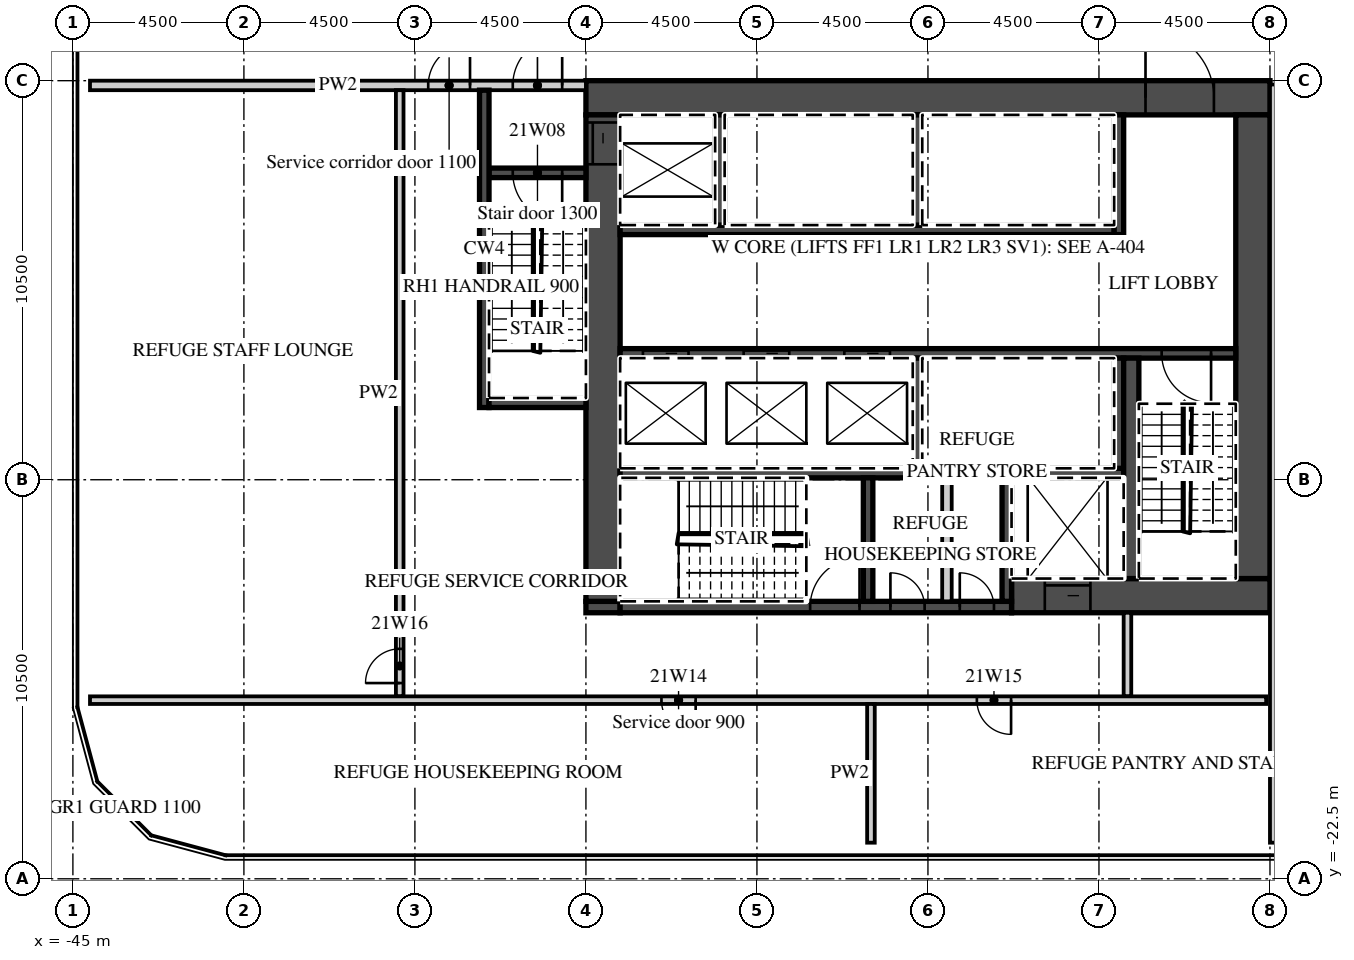
"""IFC4 building model, lengths in metres.
Left out: names, types, materials, properties, quantities, classifications, styles, units other than length and angle.
Written with IfcOpenShell. Run it as: python <this file> out.ifc"""

import sys

from ifc_helpers import new_model, si_unit, direction, frame, frame_2d, origin, place, context, subcontext, project, spatial, rectangle, extrude, element, fill, save


model = new_model("IFC4")
c1 = context("Model", 3, precision=1e-05, world=origin(), true_north=direction((0.0, 1.0)))
c2 = subcontext(c1, "Body", "Model", "MODEL_VIEW")
j1 = project(units=[si_unit("LENGTHUNIT", "METRE"), si_unit("PLANEANGLEUNIT", "RADIAN")], contexts=[c1])
p1 = place(None, origin())
s1 = spatial("IfcSite", under=j1, at=p1, CompositionType="ELEMENT")
p2 = place(p1, origin())
s2 = spatial("IfcBuilding", under=s1, at=p2, CompositionType="ELEMENT")
p3 = place(p2, frame((0.0, 0.0, 99.6)))
s3 = spatial("IfcBuildingStorey", under=s2, at=p3, CompositionType="ELEMENT", Elevation=99.6)
p4 = place(p3, frame((-31.5, -1.95, 0.0), z_axis=(0.0, 0.0, 1.0), x_axis=(1.0, 0.0, 0.0)))
e1 = element("IfcWall", 1, at=p4, inside=s3, PredefinedType="SHEAR", context=c2, shape_type="SweptSolid", body=[
    extrude(rectangle(XDim=18.0, YDim=0.9, at=frame_2d((9.0, 0.0))), origin(), (0.0, 0.0, 1.0), 4.2),
])
p5 = place(p4, frame((14.725, 0.0, 0.0)))
e2 = element("IfcOpeningElement", 2, at=p5, cuts=e1, PredefinedType="OPENING", context=c2, shape_type="SweptSolid", body=[
    extrude(rectangle(XDim=1.8, YDim=2.1, at=frame_2d((0.9, 1.05))), frame((0.0, 0.46, 0.0), z_axis=(0.0, -1.0, 0.0), x_axis=(1.0, 0.0, 0.0)), (0.0, 0.0, 1.0), 0.92),
])
p6 = place(p3, frame((-20.3, -15.05, 0.0), z_axis=(0.0, 0.0, 1.0), x_axis=(1.0, 0.0, 0.0)))
e3 = element("IfcWall", 3, at=p6, inside=s3, PredefinedType="SHEAR", context=c2, shape_type="SweptSolid", body=[
    extrude(rectangle(XDim=6.8, YDim=0.9, at=frame_2d((3.4, 0.0))), origin(), (0.0, 0.0, 1.0), 4.2),
])
p7 = place(p6, frame((0.875, 0.0, 0.0)))
e4 = element("IfcOpeningElement", 4, at=p7, cuts=e3, PredefinedType="OPENING", context=c2, shape_type="SweptSolid", body=[
    extrude(rectangle(XDim=1.2, YDim=2.1, at=frame_2d((0.6, 1.05))), frame((0.0, 0.46, 0.0), z_axis=(0.0, -1.0, 0.0), x_axis=(1.0, 0.0, 0.0)), (0.0, 0.0, 1.0), 0.92),
])
p8 = place(p3, frame((-31.5, -15.35, 0.0), z_axis=(0.0, 0.0, 1.0), x_axis=(1.0, 0.0, 0.0)))
e5 = element("IfcWall", 5, at=p8, inside=s3, PredefinedType="SHEAR", context=c2, shape_type="SweptSolid", body=[
    extrude(rectangle(XDim=0.9, YDim=0.3, at=frame_2d((0.45, 0.0))), origin(), (0.0, 0.0, 1.0), 4.2),
])
p9 = place(p3, frame((-30.6, -15.35, 0.0), z_axis=(0.0, 0.0, 1.0), x_axis=(1.0, 0.0, 0.0)))
e6 = element("IfcWall", 6, at=p9, inside=s3, PredefinedType="SHEAR", context=c2, shape_type="SweptSolid", body=[
    extrude(rectangle(XDim=10.3, YDim=0.3, at=frame_2d((5.15, 0.0))), origin(), (0.0, 0.0, 1.0), 4.2),
])
p10 = place(p9, frame((5.0, 0.0, 0.0)))
e7 = element("IfcOpeningElement", 7, at=p10, cuts=e6, PredefinedType="OPENING", context=c2, shape_type="SweptSolid", body=[
    extrude(rectangle(XDim=1.3, YDim=2.1, at=frame_2d((0.65, 1.05))), frame((0.0, 0.16, 0.0), z_axis=(0.0, -1.0, 0.0), x_axis=(1.0, 0.0, 0.0)), (0.0, 0.0, 1.0), 0.32),
])
p11 = place(p9, frame((7.113, 0.0, 0.0)))
e8 = element("IfcOpeningElement", 8, at=p11, cuts=e6, PredefinedType="OPENING", context=c2, shape_type="SweptSolid", body=[
    extrude(rectangle(XDim=0.9, YDim=2.1, at=frame_2d((0.45, 1.05))), frame((0.0, 0.16, 0.0), z_axis=(0.0, -1.0, 0.0), x_axis=(1.0, 0.0, 0.0)), (0.0, 0.0, 1.0), 0.32),
])
p12 = place(p9, frame((8.938, 0.0, 0.0)))
e9 = element("IfcOpeningElement", 9, at=p12, cuts=e6, PredefinedType="OPENING", context=c2, shape_type="SweptSolid", body=[
    extrude(rectangle(XDim=0.9, YDim=2.1, at=frame_2d((0.45, 1.05))), frame((0.0, 0.16, 0.0), z_axis=(0.0, -1.0, 0.0), x_axis=(1.0, 0.0, 0.0)), (0.0, 0.0, 1.0), 0.32),
])
p13 = place(p3, frame((-31.05, -15.2, 0.0), z_axis=(0.0, 0.0, 1.0), x_axis=(0.0, 1.0, 0.0)))
e10 = element("IfcWall", 10, at=p13, inside=s3, PredefinedType="SHEAR", context=c2, shape_type="SweptSolid", body=[
    extrude(rectangle(XDim=12.8, YDim=0.9, at=frame_2d((6.4, 0.0))), origin(), (0.0, 0.0, 1.0), 4.2),
])
p14 = place(p13, frame((11.5, 0.0, 0.0)))
e11 = element("IfcOpeningElement", 11, at=p14, cuts=e10, PredefinedType="OPENING", context=c2, shape_type="SweptSolid", body=[
    extrude(rectangle(XDim=1.1, YDim=2.1, at=frame_2d((0.55, 1.05))), frame((0.0, 0.46, 0.0), z_axis=(0.0, -1.0, 0.0), x_axis=(1.0, 0.0, 0.0)), (0.0, 0.0, 1.0), 0.92),
])
p15 = place(p3, frame((-13.95, -14.6, 0.0), z_axis=(0.0, 0.0, 1.0), x_axis=(0.0, 1.0, 0.0)))
e12 = element("IfcWall", 12, at=p15, inside=s3, PredefinedType="SHEAR", context=c2, shape_type="SweptSolid", body=[
    extrude(rectangle(XDim=12.2, YDim=0.9, at=frame_2d((6.1, 0.0))), origin(), (0.0, 0.0, 1.0), 4.2),
])
p16 = place(p3, frame((-30.6, -5.425, 0.0), z_axis=(0.0, 0.0, 1.0), x_axis=(1.0, 0.0, 0.0)))
e13 = element("IfcWall", 13, at=p16, inside=s3, PredefinedType="SHEAR", context=c2, shape_type="SweptSolid", body=[
    extrude(rectangle(XDim=13.0, YDim=0.25, at=frame_2d((6.5, 0.0))), origin(), (0.0, 0.0, 1.0), 4.2),
])
p17 = place(p3, frame((-17.475, -5.55, 0.0), z_axis=(0.0, 0.0, 1.0), x_axis=(0.0, 1.0, 0.0)))
e14 = element("IfcWall", 14, at=p17, inside=s3, PredefinedType="SHEAR", context=c2, shape_type="SweptSolid", body=[
    extrude(rectangle(XDim=3.15, YDim=0.25, at=frame_2d((1.575, 0.0))), origin(), (0.0, 0.0, 1.0), 4.2),
])
for number, where, z_axis, x_axis in (
    (15, (-27.975, -5.3, 0.0), (0.0, 0.0, 1.0), (0.0, 1.0, 0.0)),
    (16, (-22.775, -5.3, 0.0), (0.0, 0.0, 1.0), (0.0, 1.0, 0.0)),
):
    element("IfcWall", number, at=place(p3, frame(where, z_axis=z_axis, x_axis=x_axis)), inside=s3, PredefinedType="SHEAR", context=c2, shape_type="SweptSolid", body=[
        extrude(rectangle(XDim=2.9, YDim=0.25, at=frame_2d((1.45, 0.0))), origin(), (0.0, 0.0, 1.0), 4.2),
    ])
p18 = place(p3, frame((-30.6, -8.675, 0.0), z_axis=(0.0, 0.0, 1.0), x_axis=(1.0, 0.0, 0.0)))
e17 = element("IfcWall", 17, at=p18, inside=s3, PredefinedType="SHEAR", context=c2, shape_type="SweptSolid", body=[
    extrude(rectangle(XDim=16.2, YDim=0.25, at=frame_2d((8.1, 0.0))), origin(), (0.0, 0.0, 1.0), 4.2),
])
p19 = place(p18, frame((0.6, 0.0, 0.0)))
e18 = element("IfcOpeningElement", 18, at=p19, cuts=e17, PredefinedType="OPENING", context=c2, shape_type="SweptSolid", body=[
    extrude(rectangle(XDim=1.2, YDim=2.1, at=frame_2d((0.6, 1.05))), frame((0.0, 0.135, 0.0), z_axis=(0.0, -1.0, 0.0), x_axis=(1.0, 0.0, 0.0)), (0.0, 0.0, 1.0), 0.27),
])
p20 = place(p18, frame((3.25, 0.0, 0.0)))
e19 = element("IfcOpeningElement", 19, at=p20, cuts=e17, PredefinedType="OPENING", context=c2, shape_type="SweptSolid", body=[
    extrude(rectangle(XDim=1.2, YDim=2.1, at=frame_2d((0.6, 1.05))), frame((0.0, 0.135, 0.0), z_axis=(0.0, -1.0, 0.0), x_axis=(1.0, 0.0, 0.0)), (0.0, 0.0, 1.0), 0.27),
])
p21 = place(p18, frame((5.9, 0.0, 0.0)))
e20 = element("IfcOpeningElement", 20, at=p21, cuts=e17, PredefinedType="OPENING", context=c2, shape_type="SweptSolid", body=[
    extrude(rectangle(XDim=1.2, YDim=2.1, at=frame_2d((0.6, 1.05))), frame((0.0, 0.135, 0.0), z_axis=(0.0, -1.0, 0.0), x_axis=(1.0, 0.0, 0.0)), (0.0, 0.0, 1.0), 0.27),
])
p22 = place(p18, frame((14.25, 0.0, 0.0)))
e21 = element("IfcOpeningElement", 21, at=p22, cuts=e17, PredefinedType="OPENING", context=c2, shape_type="SweptSolid", body=[
    extrude(rectangle(XDim=1.3, YDim=2.1, at=frame_2d((0.65, 1.05))), frame((0.0, 0.135, 0.0), z_axis=(0.0, -1.0, 0.0), x_axis=(1.0, 0.0, 0.0)), (0.0, 0.0, 1.0), 0.27),
])
p23 = place(p3, frame((-30.6, -11.825, 0.0), z_axis=(0.0, 0.0, 1.0), x_axis=(1.0, 0.0, 0.0)))
e22 = element("IfcWall", 22, at=p23, inside=s3, PredefinedType="SHEAR", context=c2, shape_type="SweptSolid", body=[
    extrude(rectangle(XDim=13.25, YDim=0.25, at=frame_2d((6.625, 0.0))), origin(), (0.0, 0.0, 1.0), 4.2),
])
for number, where, z_axis, x_axis in (
    (23, (-17.475, -11.7, 0.0), (0.0, 0.0, 1.0), (0.0, 1.0, 0.0)),
    (24, (-22.775, -11.7, 0.0), (0.0, 0.0, 1.0), (0.0, 1.0, 0.0)),
):
    element("IfcWall", number, at=place(p3, frame(where, z_axis=z_axis, x_axis=x_axis)), inside=s3, PredefinedType="SHEAR", context=c2, shape_type="SweptSolid", body=[
        extrude(rectangle(XDim=2.9, YDim=0.25, at=frame_2d((1.45, 0.0))), origin(), (0.0, 0.0, 1.0), 4.2),
    ])
p24 = place(p3, frame((-17.15, -14.6, 0.0), z_axis=(0.0, 0.0, 1.0), x_axis=(0.0, 1.0, 0.0)))
e25 = element("IfcWall", 25, at=p24, inside=s3, PredefinedType="SHEAR", context=c2, shape_type="SweptSolid", body=[
    extrude(rectangle(XDim=5.8, YDim=0.4, at=frame_2d((2.9, 0.0))), origin(), (0.0, 0.0, 1.0), 4.2),
])
for number, where, z_axis, x_axis in (
    (26, (-20.425, -15.2, 0.0), (0.0, 0.0, 1.0), (0.0, 1.0, 0.0)),
    (27, (-24.075, -15.2, 0.0), (0.0, 0.0, 1.0), (0.0, 1.0, 0.0)),
):
    element("IfcWall", number, at=place(p3, frame(where, z_axis=z_axis, x_axis=x_axis)), inside=s3, PredefinedType="SHEAR", context=c2, shape_type="SweptSolid", body=[
        extrude(rectangle(XDim=3.25, YDim=0.25, at=frame_2d((1.625, 0.0))), origin(), (0.0, 0.0, 1.0), 4.2),
    ])
p25 = place(p3, frame((-22.0, -15.2, 0.0), z_axis=(0.0, 0.0, 1.0), x_axis=(0.0, 1.0, 0.0)))
e28 = element("IfcWall", 28, at=p25, inside=s3, PredefinedType="PARTITIONING", context=c2, shape_type="SweptSolid", body=[
    extrude(rectangle(XDim=3.25, YDim=0.25, at=frame_2d((1.625, 0.0))), origin(), (0.0, 0.0, 1.0), 4.2),
])
p26 = place(p3, frame((-44.55, -1.625, 0.0), z_axis=(0.0, 0.0, 1.0), x_axis=(1.0, 0.0, 0.0)))
e29 = element("IfcWall", 29, at=p26, inside=s3, PredefinedType="PARTITIONING", context=c2, shape_type="SweptSolid", body=[
    extrude(rectangle(XDim=13.05, YDim=0.25, at=frame_2d((6.525, 0.0))), origin(), (0.0, 0.0, 1.0), 4.2),
])
p27 = place(p26, frame((11.125, 0.0, 0.0)))
e30 = element("IfcOpeningElement", 30, at=p27, cuts=e29, PredefinedType="OPENING", context=c2, shape_type="SweptSolid", body=[
    extrude(rectangle(XDim=1.3, YDim=2.1, at=frame_2d((0.65, 1.05))), frame((0.0, 0.135, 0.0), z_axis=(0.0, -1.0, 0.0), x_axis=(1.0, 0.0, 0.0)), (0.0, 0.0, 1.0), 0.27),
])
p28 = place(p26, frame((8.9, 0.0, 0.0)))
e31 = element("IfcOpeningElement", 31, at=p28, cuts=e29, PredefinedType="OPENING", context=c2, shape_type="SweptSolid", body=[
    extrude(rectangle(XDim=1.1, YDim=2.1, at=frame_2d((0.55, 1.05))), frame((0.0, 0.135, 0.0), z_axis=(0.0, -1.0, 0.0), x_axis=(1.0, 0.0, 0.0)), (0.0, 0.0, 1.0), 0.27),
])
p29 = place(p3, frame((-34.05, -3.925, 0.0), z_axis=(0.0, 0.0, 1.0), x_axis=(1.0, 0.0, 0.0)))
e32 = element("IfcWall", 32, at=p29, inside=s3, PredefinedType="SHEAR", context=c2, shape_type="SweptSolid", body=[
    extrude(rectangle(XDim=2.55, YDim=0.25, at=frame_2d((1.275, 0.0))), origin(), (0.0, 0.0, 1.0), 4.2),
])
p30 = place(p29, frame((0.625, 0.0, 0.0)))
e33 = element("IfcOpeningElement", 33, at=p30, cuts=e32, PredefinedType="OPENING", context=c2, shape_type="SweptSolid", body=[
    extrude(rectangle(XDim=1.3, YDim=2.1, at=frame_2d((0.65, 1.05))), frame((0.0, 0.135, 0.0), z_axis=(0.0, -1.0, 0.0), x_axis=(1.0, 0.0, 0.0)), (0.0, 0.0, 1.0), 0.27),
])
p31 = place(p3, frame((-34.175, -10.1, 0.0), z_axis=(0.0, 0.0, 1.0), x_axis=(0.0, 1.0, 0.0)))
e34 = element("IfcWall", 34, at=p31, inside=s3, PredefinedType="SHEAR", context=c2, shape_type="SweptSolid", body=[
    extrude(rectangle(XDim=8.35, YDim=0.25, at=frame_2d((4.175, 0.0))), origin(), (0.0, 0.0, 1.0), 4.2),
])
p32 = place(p3, frame((-34.05, -9.975, 0.0), z_axis=(0.0, 0.0, 1.0), x_axis=(1.0, 0.0, 0.0)))
e35 = element("IfcWall", 35, at=p32, inside=s3, PredefinedType="SHEAR", context=c2, shape_type="SweptSolid", body=[
    extrude(rectangle(XDim=2.55, YDim=0.25, at=frame_2d((1.275, 0.0))), origin(), (0.0, 0.0, 1.0), 4.2),
])
p33 = place(p3, frame((-17.25, -17.7, 0.0), z_axis=(0.0, 0.0, 1.0), x_axis=(0.0, 1.0, 0.0)))
e36 = element("IfcWall", 36, at=p33, inside=s3, PredefinedType="PARTITIONING", context=c2, shape_type="SweptSolid", body=[
    extrude(rectangle(XDim=2.2, YDim=0.2, at=frame_2d((1.1, 0.0))), origin(), (0.0, 0.0, 1.0), 4.2),
])
p34 = place(p3, frame((-36.4, -17.7, 0.0), z_axis=(0.0, 0.0, 1.0), x_axis=(0.0, 1.0, 0.0)))
e37 = element("IfcWall", 37, at=p34, inside=s3, PredefinedType="PARTITIONING", context=c2, shape_type="SweptSolid", body=[
    extrude(rectangle(XDim=15.95, YDim=0.2, at=frame_2d((7.975, 0.0))), origin(), (0.0, 0.0, 1.0), 4.2),
])
p35 = place(p34, frame((0.35, 0.0, 0.0)))
e38 = element("IfcOpeningElement", 38, at=p35, cuts=e37, PredefinedType="OPENING", context=c2, shape_type="SweptSolid", body=[
    extrude(rectangle(XDim=0.9, YDim=2.1, at=frame_2d((0.45, 1.05))), frame((0.0, 0.11, 0.0), z_axis=(0.0, -1.0, 0.0), x_axis=(1.0, 0.0, 0.0)), (0.0, 0.0, 1.0), 0.22),
])
p36 = place(p3, frame((-44.55, -17.8, 0.0), z_axis=(0.0, 0.0, 1.0), x_axis=(1.0, 0.0, 0.0)))
e39 = element("IfcWall", 39, at=p36, inside=s3, PredefinedType="PARTITIONING", context=c2, shape_type="SweptSolid", body=[
    extrude(rectangle(XDim=30.95, YDim=0.2, at=frame_2d((15.475, 0.0))), origin(), (0.0, 0.0, 1.0), 4.2),
])
p37 = place(p36, frame((15.038, 0.0, 0.0)))
e40 = element("IfcOpeningElement", 40, at=p37, cuts=e39, PredefinedType="OPENING", context=c2, shape_type="SweptSolid", body=[
    extrude(rectangle(XDim=0.9, YDim=2.1, at=frame_2d((0.45, 1.05))), frame((0.0, 0.11, 0.0), z_axis=(0.0, -1.0, 0.0), x_axis=(1.0, 0.0, 0.0)), (0.0, 0.0, 1.0), 0.22),
])
p38 = place(p36, frame((23.337, 0.0, 0.0)))
e41 = element("IfcOpeningElement", 41, at=p38, cuts=e39, PredefinedType="OPENING", context=c2, shape_type="SweptSolid", body=[
    extrude(rectangle(XDim=0.9, YDim=2.1, at=frame_2d((0.45, 1.05))), frame((0.0, 0.11, 0.0), z_axis=(0.0, -1.0, 0.0), x_axis=(1.0, 0.0, 0.0)), (0.0, 0.0, 1.0), 0.22),
])
p39 = place(p3, frame((-24.0, -21.55, 0.0), z_axis=(0.0, 0.0, 1.0), x_axis=(0.0, 1.0, 0.0)))
e42 = element("IfcWall", 42, at=p39, inside=s3, PredefinedType="PARTITIONING", context=c2, shape_type="SweptSolid", body=[
    extrude(rectangle(XDim=3.65, YDim=0.2, at=frame_2d((1.825, 0.0))), origin(), (0.0, 0.0, 1.0), 4.2),
])
p40 = place(p3, frame((-13.4, -21.55, 0.0), z_axis=(0.0, 0.0, 1.0), x_axis=(0.0, 1.0, 0.0)))
e43 = element("IfcWall", 43, at=p40, inside=s3, PredefinedType="PARTITIONING", context=c2, shape_type="SweptSolid", body=[
    extrude(rectangle(XDim=19.95, YDim=0.2, at=frame_2d((9.975, 0.0))), origin(), (0.0, 0.0, 1.0), 4.2),
])
p41 = place(p19, origin())
e44 = element("IfcDoor", 44, at=p41, inside=s3, OperationType="SLIDING_TO_LEFT", PredefinedType="DOOR", context=c2, shape_type="SweptSolid", body=[
    extrude(rectangle(XDim=1.2, YDim=2.1, at=frame_2d((0.6, 1.05))), frame((0.0, 0.025, 0.0), z_axis=(0.0, -1.0, 0.0), x_axis=(1.0, 0.0, 0.0)), (0.0, 0.0, 1.0), 0.05),
])
fill(e18, e44)
p42 = place(p20, origin())
e45 = element("IfcDoor", 45, at=p42, inside=s3, OperationType="SLIDING_TO_RIGHT", PredefinedType="DOOR", context=c2, shape_type="SweptSolid", body=[
    extrude(rectangle(XDim=1.2, YDim=2.1, at=frame_2d((0.6, 1.05))), frame((0.0, 0.025, 0.0), z_axis=(0.0, -1.0, 0.0), x_axis=(1.0, 0.0, 0.0)), (0.0, 0.0, 1.0), 0.05),
])
fill(e19, e45)
p43 = place(p21, origin())
e46 = element("IfcDoor", 46, at=p43, inside=s3, OperationType="SLIDING_TO_RIGHT", PredefinedType="DOOR", context=c2, shape_type="SweptSolid", body=[
    extrude(rectangle(XDim=1.2, YDim=2.1, at=frame_2d((0.6, 1.05))), frame((0.0, 0.025, 0.0), z_axis=(0.0, -1.0, 0.0), x_axis=(1.0, 0.0, 0.0)), (0.0, 0.0, 1.0), 0.05),
])
fill(e20, e46)
p44 = place(p7, origin())
e47 = element("IfcDoor", 47, at=p44, inside=s3, OperationType="SLIDING_TO_LEFT", PredefinedType="DOOR", context=c2, shape_type="SweptSolid", body=[
    extrude(rectangle(XDim=1.2, YDim=2.1, at=frame_2d((0.6, 1.05))), frame((0.0, 0.025, 0.0), z_axis=(0.0, -1.0, 0.0), x_axis=(1.0, 0.0, 0.0)), (0.0, 0.0, 1.0), 0.05),
])
fill(e4, e47)
p45 = place(p14, origin())
e48 = element("IfcDoor", 48, at=p45, inside=s3, OperationType="SLIDING_TO_RIGHT", PredefinedType="DOOR", context=c2, shape_type="SweptSolid", body=[
    extrude(rectangle(XDim=1.1, YDim=2.1, at=frame_2d((0.55, 1.05))), frame((0.0, 0.025, 0.0), z_axis=(0.0, -1.0, 0.0), x_axis=(1.0, 0.0, 0.0)), (0.0, 0.0, 1.0), 0.05),
])
fill(e11, e48)
p46 = place(p5, origin())
e49 = element("IfcDoor", 49, at=p46, inside=s3, OperationType="DOUBLE_DOOR_DOUBLE_SWING", PredefinedType="DOOR", context=c2, shape_type="SweptSolid", body=[
    extrude(rectangle(XDim=1.8, YDim=2.1, at=frame_2d((0.9, 1.05))), frame((0.0, 0.025, 0.0), z_axis=(0.0, -1.0, 0.0), x_axis=(1.0, 0.0, 0.0)), (0.0, 0.0, 1.0), 0.05),
])
fill(e2, e49)
p47 = place(p27, origin())
e50 = element("IfcDoor", 50, at=p47, inside=s3, OperationType="SINGLE_SWING_RIGHT", PredefinedType="DOOR", context=c2, shape_type="SweptSolid", body=[
    extrude(rectangle(XDim=1.3, YDim=2.1, at=frame_2d((0.65, 1.05))), frame((0.0, 0.025, 0.0), z_axis=(0.0, -1.0, 0.0), x_axis=(1.0, 0.0, 0.0)), (0.0, 0.0, 1.0), 0.05),
])
fill(e30, e50)
p48 = place(p30, origin())
e51 = element("IfcDoor", 51, at=p48, inside=s3, OperationType="SINGLE_SWING_RIGHT", PredefinedType="DOOR", context=c2, shape_type="SweptSolid", body=[
    extrude(rectangle(XDim=1.3, YDim=2.1, at=frame_2d((0.65, 1.05))), frame((0.0, 0.025, 0.0), z_axis=(0.0, -1.0, 0.0), x_axis=(1.0, 0.0, 0.0)), (0.0, 0.0, 1.0), 0.05),
])
fill(e33, e51)
p49 = place(p28, origin())
e52 = element("IfcDoor", 52, at=p49, inside=s3, OperationType="SINGLE_SWING_RIGHT", PredefinedType="DOOR", context=c2, shape_type="SweptSolid", body=[
    extrude(rectangle(XDim=1.1, YDim=2.1, at=frame_2d((0.55, 1.05))), frame((0.0, 0.025, 0.0), z_axis=(0.0, -1.0, 0.0), x_axis=(1.0, 0.0, 0.0)), (0.0, 0.0, 1.0), 0.05),
])
fill(e31, e52)
p50 = place(p22, origin())
e53 = element("IfcDoor", 53, at=p50, inside=s3, OperationType="SINGLE_SWING_RIGHT", PredefinedType="DOOR", context=c2, shape_type="SweptSolid", body=[
    extrude(rectangle(XDim=1.3, YDim=2.1, at=frame_2d((0.65, 1.05))), frame((0.0, 0.025, 0.0), z_axis=(0.0, -1.0, 0.0), x_axis=(1.0, 0.0, 0.0)), (0.0, 0.0, 1.0), 0.05),
])
fill(e21, e53)
p51 = place(p10, origin())
e54 = element("IfcDoor", 54, at=p51, inside=s3, OperationType="SINGLE_SWING_RIGHT", PredefinedType="DOOR", context=c2, shape_type="SweptSolid", body=[
    extrude(rectangle(XDim=1.3, YDim=2.1, at=frame_2d((0.65, 1.05))), frame((0.0, 0.025, 0.0), z_axis=(0.0, -1.0, 0.0), x_axis=(1.0, 0.0, 0.0)), (0.0, 0.0, 1.0), 0.05),
])
fill(e7, e54)
p52 = place(p11, origin())
e55 = element("IfcDoor", 55, at=p52, inside=s3, OperationType="SINGLE_SWING_LEFT", PredefinedType="DOOR", context=c2, shape_type="SweptSolid", body=[
    extrude(rectangle(XDim=0.9, YDim=2.1, at=frame_2d((0.45, 1.05))), frame((0.0, 0.025, 0.0), z_axis=(0.0, -1.0, 0.0), x_axis=(1.0, 0.0, 0.0)), (0.0, 0.0, 1.0), 0.05),
])
fill(e8, e55)
p53 = place(p12, origin())
e56 = element("IfcDoor", 56, at=p53, inside=s3, OperationType="SINGLE_SWING_LEFT", PredefinedType="DOOR", context=c2, shape_type="SweptSolid", body=[
    extrude(rectangle(XDim=0.9, YDim=2.1, at=frame_2d((0.45, 1.05))), frame((0.0, 0.025, 0.0), z_axis=(0.0, -1.0, 0.0), x_axis=(1.0, 0.0, 0.0)), (0.0, 0.0, 1.0), 0.05),
])
fill(e9, e56)
p54 = place(p37, origin())
e57 = element("IfcDoor", 57, at=p54, inside=s3, OperationType="SINGLE_SWING_RIGHT", PredefinedType="DOOR", context=c2, shape_type="SweptSolid", body=[
    extrude(rectangle(XDim=0.9, YDim=2.1, at=frame_2d((0.45, 1.05))), frame((0.0, 0.025, 0.0), z_axis=(0.0, -1.0, 0.0), x_axis=(1.0, 0.0, 0.0)), (0.0, 0.0, 1.0), 0.05),
])
fill(e40, e57)
p55 = place(p38, origin())
e58 = element("IfcDoor", 58, at=p55, inside=s3, OperationType="SINGLE_SWING_RIGHT", PredefinedType="DOOR", context=c2, shape_type="SweptSolid", body=[
    extrude(rectangle(XDim=0.9, YDim=2.1, at=frame_2d((0.45, 1.05))), frame((0.0, 0.025, 0.0), z_axis=(0.0, -1.0, 0.0), x_axis=(1.0, 0.0, 0.0)), (0.0, 0.0, 1.0), 0.05),
])
fill(e41, e58)
p56 = place(p35, origin())
e59 = element("IfcDoor", 59, at=p56, inside=s3, OperationType="SINGLE_SWING_LEFT", PredefinedType="DOOR", context=c2, shape_type="SweptSolid", body=[
    extrude(rectangle(XDim=0.9, YDim=2.1, at=frame_2d((0.45, 1.05))), frame((0.0, 0.025, 0.0), z_axis=(0.0, -1.0, 0.0), x_axis=(1.0, 0.0, 0.0)), (0.0, 0.0, 1.0), 0.05),
])
fill(e38, e59)
save(model, sys.argv[1])
